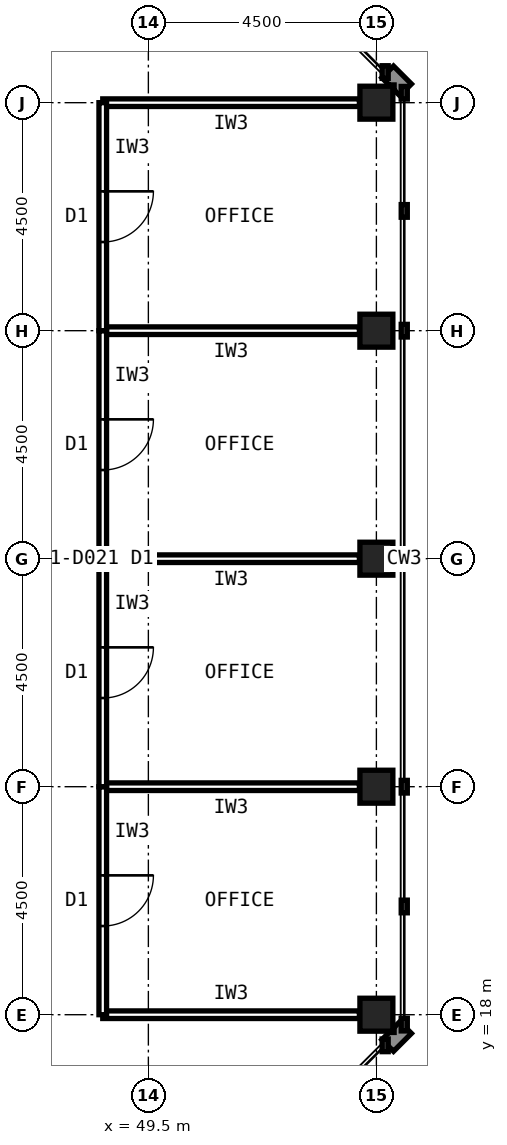
"""IFC4 building model, lengths in metres.
Left out: names, types, materials, properties, quantities, classifications, styles, units other than length and angle.
Written with IfcOpenShell. Run it as: python <this file> out.ifc"""

import sys

from ifc_helpers import new_model, si_unit, direction, frame, frame_2d, origin, origin_2d, place, context, subcontext, project, spatial, rectangle, hollow_rectangle, extrude, element, fill, save


model = new_model("IFC4")
c1 = context("Model", 3, precision=1e-05, world=origin(), true_north=direction((0.0, 1.0)))
c2 = subcontext(c1, "Body", "Model", "MODEL_VIEW")
j1 = project(units=[si_unit("LENGTHUNIT", "METRE"), si_unit("PLANEANGLEUNIT", "RADIAN")], contexts=[c1])
p1 = place(None, origin())
s1 = spatial("IfcSite", under=j1, at=p1, CompositionType="ELEMENT")
p2 = place(p1, origin())
s2 = spatial("IfcBuilding", under=s1, at=p2, CompositionType="ELEMENT")
p3 = place(p2, frame((0.0, 0.0, 214.6)))
s3 = spatial("IfcBuildingStorey", under=s2, at=p3, CompositionType="ELEMENT", Elevation=214.6)
for number, where, z_axis, x_axis in (
    (1, (54.0, 18.0, 0.0), (0.0, 0.0, 1.0), (1.0, 0.0, 0.0)),
    (2, (54.0, 22.5, 0.0), (0.0, 0.0, 1.0), (1.0, 0.0, 0.0)),
    (3, (54.0, 27.0, 0.0), (0.0, 0.0, 1.0), (1.0, 0.0, 0.0)),
    (4, (54.0, 31.5, 0.0), (0.0, 0.0, 1.0), (1.0, 0.0, 0.0)),
    (5, (54.0, 36.0, 0.0), (0.0, 0.0, 1.0), (1.0, 0.0, 0.0)),
):
    element("IfcColumn", number, at=place(p3, frame(where, z_axis=z_axis, x_axis=x_axis)), inside=s3, PredefinedType="COLUMN", context=c2, shape_type="SweptSolid", body=[
        extrude(hollow_rectangle(XDim=0.65, YDim=0.65, WallThickness=0.032, at=origin_2d()), origin(), (0.0, 0.0, 1.0), 4.0),
    ])
for number, where, z_axis, x_axis in (
    (6, (48.6, 18.0, 0.0), (0.0, 0.0, 1.0), (1.0, 0.0, 0.0)),
    (7, (53.665, 22.5, 0.0), (0.0, 0.0, 1.0), (-1.0, 0.0, 0.0)),
):
    element("IfcWall", number, at=place(p3, frame(where, z_axis=z_axis, x_axis=x_axis)), inside=s3, PredefinedType="PARTITIONING", context=c2, shape_type="SweptSolid", body=[
        extrude(rectangle(XDim=5.065, YDim=0.15, at=frame_2d((2.532, 0.0))), origin(), (0.0, 0.0, 1.0), 2.989),
    ])
p4 = place(p3, frame((48.6, 22.5, 0.0), z_axis=(0.0, 0.0, 1.0), x_axis=(0.0, -1.0, 0.0)))
e8 = element("IfcWall", 8, at=p4, inside=s3, PredefinedType="PARTITIONING", context=c2, shape_type="SweptSolid", body=[
    extrude(rectangle(XDim=4.5, YDim=0.15, at=frame_2d((2.25, 0.0))), origin(), (0.0, 0.0, 1.0), 3.84),
])
p5 = place(p4, frame((1.75, 0.0, 0.0)))
e9 = element("IfcOpeningElement", 9, at=p5, cuts=e8, PredefinedType="OPENING", context=c2, shape_type="SweptSolid", body=[
    extrude(rectangle(XDim=1.0, YDim=2.1, at=frame_2d((0.5, 1.05))), frame((0.0, 0.085, 0.0), z_axis=(0.0, -1.0, 0.0), x_axis=(1.0, 0.0, 0.0)), (0.0, 0.0, 1.0), 0.17),
])
p6 = place(p3, frame((53.665, 27.0, 0.0), z_axis=(0.0, 0.0, 1.0), x_axis=(-1.0, 0.0, 0.0)))
e10 = element("IfcWall", 10, at=p6, inside=s3, PredefinedType="PARTITIONING", context=c2, shape_type="SweptSolid", body=[
    extrude(rectangle(XDim=5.065, YDim=0.15, at=frame_2d((2.532, 0.0))), origin(), (0.0, 0.0, 1.0), 2.989),
])
p7 = place(p3, frame((48.6, 27.0, 0.0), z_axis=(0.0, 0.0, 1.0), x_axis=(0.0, -1.0, 0.0)))
e11 = element("IfcWall", 11, at=p7, inside=s3, PredefinedType="PARTITIONING", context=c2, shape_type="SweptSolid", body=[
    extrude(rectangle(XDim=4.5, YDim=0.15, at=frame_2d((2.25, 0.0))), origin(), (0.0, 0.0, 1.0), 3.84),
])
p8 = place(p7, frame((1.75, 0.0, 0.0)))
e12 = element("IfcOpeningElement", 12, at=p8, cuts=e11, PredefinedType="OPENING", context=c2, shape_type="SweptSolid", body=[
    extrude(rectangle(XDim=1.0, YDim=2.1, at=frame_2d((0.5, 1.05))), frame((0.0, 0.085, 0.0), z_axis=(0.0, -1.0, 0.0), x_axis=(1.0, 0.0, 0.0)), (0.0, 0.0, 1.0), 0.17),
])
p9 = place(p3, frame((53.665, 31.5, 0.0), z_axis=(0.0, 0.0, 1.0), x_axis=(-1.0, 0.0, 0.0)))
e13 = element("IfcWall", 13, at=p9, inside=s3, PredefinedType="PARTITIONING", context=c2, shape_type="SweptSolid", body=[
    extrude(rectangle(XDim=5.065, YDim=0.15, at=frame_2d((2.532, 0.0))), origin(), (0.0, 0.0, 1.0), 2.989),
])
p10 = place(p3, frame((48.6, 31.5, 0.0), z_axis=(0.0, 0.0, 1.0), x_axis=(0.0, -1.0, 0.0)))
e14 = element("IfcWall", 14, at=p10, inside=s3, PredefinedType="PARTITIONING", context=c2, shape_type="SweptSolid", body=[
    extrude(rectangle(XDim=4.5, YDim=0.15, at=frame_2d((2.25, 0.0))), origin(), (0.0, 0.0, 1.0), 3.84),
])
p11 = place(p10, frame((1.75, 0.0, 0.0)))
e15 = element("IfcOpeningElement", 15, at=p11, cuts=e14, PredefinedType="OPENING", context=c2, shape_type="SweptSolid", body=[
    extrude(rectangle(XDim=1.0, YDim=2.1, at=frame_2d((0.5, 1.05))), frame((0.0, 0.085, 0.0), z_axis=(0.0, -1.0, 0.0), x_axis=(1.0, 0.0, 0.0)), (0.0, 0.0, 1.0), 0.17),
])
p12 = place(p3, frame((53.665, 36.0, 0.0), z_axis=(0.0, 0.0, 1.0), x_axis=(-1.0, 0.0, 0.0)))
e16 = element("IfcWall", 16, at=p12, inside=s3, PredefinedType="PARTITIONING", context=c2, shape_type="SweptSolid", body=[
    extrude(rectangle(XDim=5.065, YDim=0.15, at=frame_2d((2.532, 0.0))), origin(), (0.0, 0.0, 1.0), 2.989),
])
p13 = place(p3, frame((48.6, 36.0, 0.0), z_axis=(0.0, 0.0, 1.0), x_axis=(0.0, -1.0, 0.0)))
e17 = element("IfcWall", 17, at=p13, inside=s3, PredefinedType="PARTITIONING", context=c2, shape_type="SweptSolid", body=[
    extrude(rectangle(XDim=4.5, YDim=0.15, at=frame_2d((2.25, 0.0))), origin(), (0.0, 0.0, 1.0), 3.84),
])
p14 = place(p13, frame((1.75, 0.0, 0.0)))
e18 = element("IfcOpeningElement", 18, at=p14, cuts=e17, PredefinedType="OPENING", context=c2, shape_type="SweptSolid", body=[
    extrude(rectangle(XDim=1.0, YDim=2.1, at=frame_2d((0.5, 1.05))), frame((0.0, 0.085, 0.0), z_axis=(0.0, -1.0, 0.0), x_axis=(1.0, 0.0, 0.0)), (0.0, 0.0, 1.0), 0.17),
])
p15 = place(p5, origin())
e19 = element("IfcDoor", 19, at=p15, inside=s3, OperationType="SINGLE_SWING_LEFT", PredefinedType="DOOR", context=c2, shape_type="SweptSolid", body=[
    extrude(rectangle(XDim=1.0, YDim=2.1, at=frame_2d((0.5, 1.05))), frame((0.0, 0.025, 0.0), z_axis=(0.0, -1.0, 0.0), x_axis=(1.0, 0.0, 0.0)), (0.0, 0.0, 1.0), 0.05),
])
fill(e9, e19)
p16 = place(p8, origin())
e20 = element("IfcDoor", 20, at=p16, inside=s3, OperationType="SINGLE_SWING_LEFT", PredefinedType="DOOR", context=c2, shape_type="SweptSolid", body=[
    extrude(rectangle(XDim=1.0, YDim=2.1, at=frame_2d((0.5, 1.05))), frame((0.0, 0.025, 0.0), z_axis=(0.0, -1.0, 0.0), x_axis=(1.0, 0.0, 0.0)), (0.0, 0.0, 1.0), 0.05),
])
fill(e12, e20)
p17 = place(p11, origin())
e21 = element("IfcDoor", 21, at=p17, inside=s3, OperationType="SINGLE_SWING_LEFT", PredefinedType="DOOR", context=c2, shape_type="SweptSolid", body=[
    extrude(rectangle(XDim=1.0, YDim=2.1, at=frame_2d((0.5, 1.05))), frame((0.0, 0.025, 0.0), z_axis=(0.0, -1.0, 0.0), x_axis=(1.0, 0.0, 0.0)), (0.0, 0.0, 1.0), 0.05),
])
fill(e15, e21)
p18 = place(p14, origin())
e22 = element("IfcDoor", 22, at=p18, inside=s3, OperationType="SINGLE_SWING_LEFT", PredefinedType="DOOR", context=c2, shape_type="SweptSolid", body=[
    extrude(rectangle(XDim=1.0, YDim=2.1, at=frame_2d((0.5, 1.05))), frame((0.0, 0.025, 0.0), z_axis=(0.0, -1.0, 0.0), x_axis=(1.0, 0.0, 0.0)), (0.0, 0.0, 1.0), 0.05),
])
fill(e18, e22)
save(model, sys.argv[1])
